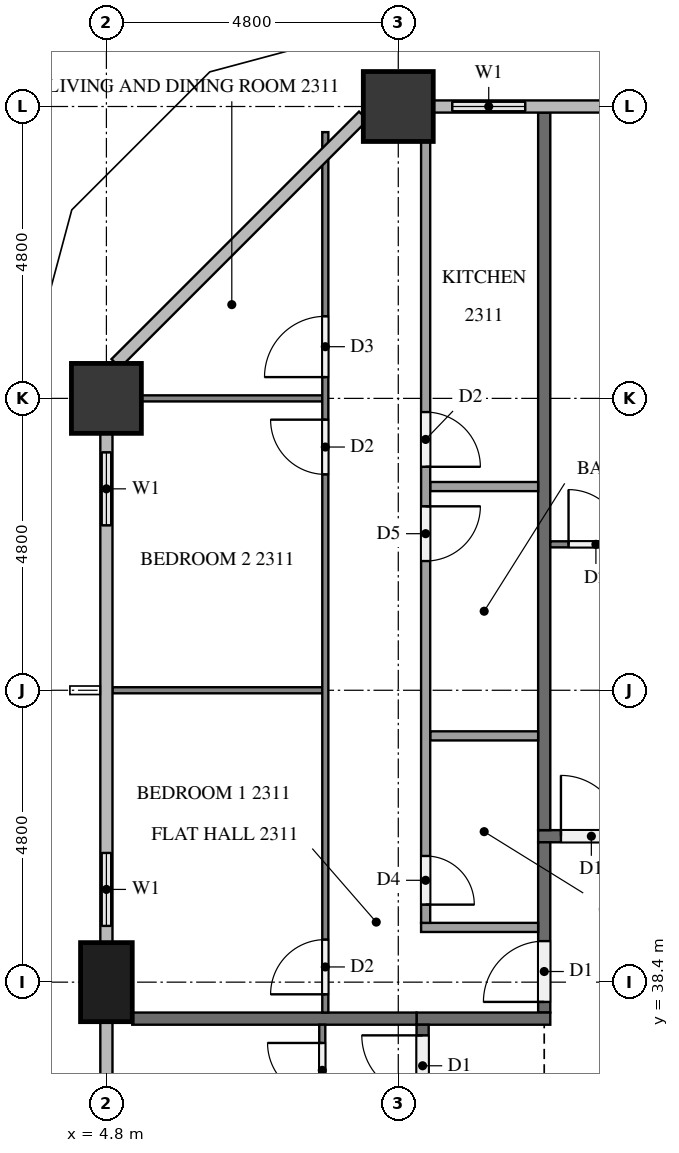
"""IFC4 building model, lengths in metres.
Left out: names, types, materials, properties, quantities, classifications, styles, units other than length and angle.
Written with IfcOpenShell. Run it as: python <this file> out.ifc"""

import sys

from ifc_helpers import new_model, si_unit, direction, frame, frame_2d, origin, origin_2d, place, context, subcontext, project, spatial, rectangle, extrude, element, fill, save


model = new_model("IFC4")
c1 = context("Model", 3, precision=1e-05, world=origin(), true_north=direction((0.0, 1.0)))
c2 = subcontext(c1, "Body", "Model", "MODEL_VIEW")
j1 = project(units=[si_unit("LENGTHUNIT", "METRE"), si_unit("PLANEANGLEUNIT", "RADIAN")], contexts=[c1])
p1 = place(None, origin())
s1 = spatial("IfcSite", under=j1, at=p1, CompositionType="ELEMENT")
p2 = place(p1, origin())
s2 = spatial("IfcBuilding", under=s1, at=p2, CompositionType="ELEMENT")
p3 = place(p2, frame((0.0, 0.0, 92.7)))
s3 = spatial("IfcBuildingStorey", under=s2, at=p3, CompositionType="ELEMENT", Elevation=92.7)
for number, where, z_axis, x_axis in (
    (1, (9.6, 52.8, 0.0), (0.0, 0.0, 1.0), (1.0, 0.0, 0.0)),
    (2, (4.8, 48.0, 0.0), (0.0, 0.0, 1.0), (1.0, 0.0, 0.0)),
):
    element("IfcColumn", number, at=place(p3, frame(where, z_axis=z_axis, x_axis=x_axis)), inside=s3, PredefinedType="COLUMN", context=c2, shape_type="SweptSolid", body=[
        extrude(rectangle(XDim=1.15, YDim=1.15, at=origin_2d()), origin(), (0.0, 0.0, 1.0), 3.2),
    ])
p4 = place(p3, frame((4.8, 38.4, 0.0), z_axis=(0.0, 0.0, 1.0), x_axis=(0.0, 1.0, 0.0)))
e3 = element("IfcColumn", 3, at=p4, inside=s3, PredefinedType="COLUMN", context=c2, shape_type="SweptSolid", body=[
    extrude(rectangle(XDim=1.3, YDim=0.85, at=origin_2d()), origin(), (0.0, 0.0, 1.0), 3.2),
])
p5 = place(p3, frame((12.0, 52.8, 0.0), z_axis=(0.0, 0.0, 1.0), x_axis=(-1.0, 0.0, 0.0)))
e4 = element("IfcWall", 4, at=p5, inside=s3, PredefinedType="SOLIDWALL", context=c2, shape_type="SweptSolid", body=[
    extrude(rectangle(XDim=1.825, YDim=0.15, at=frame_2d((0.913, 0.0))), origin(), (0.0, 0.0, 1.0), 3.2),
])
p6 = place(p5, frame((0.312, 0.0, 0.9)))
e5 = element("IfcOpeningElement", 5, at=p6, cuts=e4, PredefinedType="OPENING", context=c2, shape_type="SweptSolid", body=[
    extrude(rectangle(XDim=1.2, YDim=1.4, at=frame_2d((0.6, 0.7))), frame((0.0, 0.085, 0.0), z_axis=(0.0, -1.0, 0.0), x_axis=(1.0, 0.0, 0.0)), (0.0, 0.0, 1.0), 0.17),
])
p7 = place(p3, frame((4.8, 47.425, 0.0), z_axis=(0.0, 0.0, 1.0), x_axis=(0.0, -1.0, 0.0)))
e6 = element("IfcWall", 6, at=p7, inside=s3, PredefinedType="SOLIDWALL", context=c2, shape_type="SweptSolid", body=[
    extrude(rectangle(XDim=1.825, YDim=0.15, at=frame_2d((0.913, 0.0))), origin(), (0.0, 0.0, 1.0), 3.2),
])
p8 = place(p7, frame((0.312, 0.0, 0.9)))
e7 = element("IfcOpeningElement", 7, at=p8, cuts=e6, PredefinedType="OPENING", context=c2, shape_type="SweptSolid", body=[
    extrude(rectangle(XDim=1.2, YDim=1.4, at=frame_2d((0.6, 0.7))), frame((0.0, 0.085, 0.0), z_axis=(0.0, -1.0, 0.0), x_axis=(1.0, 0.0, 0.0)), (0.0, 0.0, 1.0), 0.17),
])
p9 = place(p3, frame((4.8, 40.8, 0.0), z_axis=(0.0, 0.0, 1.0), x_axis=(0.0, -1.0, 0.0)))
e8 = element("IfcWall", 8, at=p9, inside=s3, PredefinedType="SOLIDWALL", context=c2, shape_type="SweptSolid", body=[
    extrude(rectangle(XDim=1.75, YDim=0.15, at=frame_2d((0.875, 0.0))), origin(), (0.0, 0.0, 1.0), 3.2),
])
p10 = place(p9, frame((0.275, 0.0, 0.9)))
e9 = element("IfcOpeningElement", 9, at=p10, cuts=e8, PredefinedType="OPENING", context=c2, shape_type="SweptSolid", body=[
    extrude(rectangle(XDim=1.2, YDim=1.4, at=frame_2d((0.6, 0.7))), frame((0.0, 0.085, 0.0), z_axis=(0.0, -1.0, 0.0), x_axis=(1.0, 0.0, 0.0)), (0.0, 0.0, 1.0), 0.17),
])
p11 = place(p3, frame((11.9, 40.8, 0.0), z_axis=(0.0, 0.0, 1.0), x_axis=(1.0, 0.0, 0.0)))
e10 = element("IfcWall", 10, at=p11, inside=s3, PredefinedType="PARTITIONING", context=c2, shape_type="SweptSolid", body=[
    extrude(rectangle(XDim=38.6, YDim=0.2, at=frame_2d((19.3, 0.0))), origin(), (0.0, 0.0, 1.0), 3.2),
])
p12 = place(p11, frame((31.575, 0.0, 0.0)))
e11 = element("IfcOpeningElement", 11, at=p12, cuts=e10, PredefinedType="OPENING", context=c2, shape_type="SweptSolid", body=[
    extrude(rectangle(XDim=1.0, YDim=2.1, at=frame_2d((0.5, 1.05))), frame((0.0, 0.11, 0.0), z_axis=(0.0, -1.0, 0.0), x_axis=(1.0, 0.0, 0.0)), (0.0, 0.0, 1.0), 0.22),
])
p13 = place(p11, frame((14.775, 0.0, 0.0)))
e12 = element("IfcOpeningElement", 12, at=p13, cuts=e10, PredefinedType="OPENING", context=c2, shape_type="SweptSolid", body=[
    extrude(rectangle(XDim=1.0, YDim=2.1, at=frame_2d((0.5, 1.05))), frame((0.0, 0.11, 0.0), z_axis=(0.0, -1.0, 0.0), x_axis=(1.0, 0.0, 0.0)), (0.0, 0.0, 1.0), 0.22),
])
p14 = place(p11, frame((0.375, 0.0, 0.0)))
e13 = element("IfcOpeningElement", 13, at=p14, cuts=e10, PredefinedType="OPENING", context=c2, shape_type="SweptSolid", body=[
    extrude(rectangle(XDim=1.0, YDim=2.1, at=frame_2d((0.5, 1.05))), frame((0.0, 0.11, 0.0), z_axis=(0.0, -1.0, 0.0), x_axis=(1.0, 0.0, 0.0)), (0.0, 0.0, 1.0), 0.22),
])
p15 = place(p3, frame((12.0, 37.9, 0.0), z_axis=(0.0, 0.0, 1.0), x_axis=(0.0, 1.0, 0.0)))
e14 = element("IfcWall", 14, at=p15, inside=s3, PredefinedType="PARTITIONING", context=c2, shape_type="SweptSolid", body=[
    extrude(rectangle(XDim=2.8, YDim=0.2, at=frame_2d((1.4, 0.0))), origin(), (0.0, 0.0, 1.0), 3.2),
])
p16 = place(p15, frame((0.175, 0.0, 0.0)))
e15 = element("IfcOpeningElement", 15, at=p16, cuts=e14, PredefinedType="OPENING", context=c2, shape_type="SweptSolid", body=[
    extrude(rectangle(XDim=1.0, YDim=2.1, at=frame_2d((0.5, 1.05))), frame((0.0, 0.11, 0.0), z_axis=(0.0, -1.0, 0.0), x_axis=(1.0, 0.0, 0.0)), (0.0, 0.0, 1.0), 0.22),
])
p17 = place(p3, frame((12.1, 37.8, 0.0), z_axis=(0.0, 0.0, 1.0), x_axis=(-1.0, 0.0, 0.0)))
e16 = element("IfcWall", 16, at=p17, inside=s3, PredefinedType="PARTITIONING", context=c2, shape_type="SweptSolid", body=[
    extrude(rectangle(XDim=2.2, YDim=0.2, at=frame_2d((1.1, 0.0))), origin(), (0.0, 0.0, 1.0), 3.2),
])
p18 = place(p3, frame((10.0, 15.1, 0.0), z_axis=(0.0, 0.0, 1.0), x_axis=(0.0, 1.0, 0.0)))
e17 = element("IfcWall", 17, at=p18, inside=s3, PredefinedType="PARTITIONING", context=c2, shape_type="SweptSolid", body=[
    extrude(rectangle(XDim=22.6, YDim=0.2, at=frame_2d((11.3, 0.0))), origin(), (0.0, 0.0, 1.0), 3.2),
])
p19 = place(p18, frame((21.425, 0.0, 0.0)))
e18 = element("IfcOpeningElement", 18, at=p19, cuts=e17, PredefinedType="OPENING", context=c2, shape_type="SweptSolid", body=[
    extrude(rectangle(XDim=1.0, YDim=2.1, at=frame_2d((0.5, 1.05))), frame((0.0, 0.11, 0.0), z_axis=(0.0, -1.0, 0.0), x_axis=(1.0, 0.0, 0.0)), (0.0, 0.0, 1.0), 0.22),
])
p20 = place(p3, frame((12.0, 52.7, 0.0), z_axis=(0.0, 0.0, 1.0), x_axis=(0.0, -1.0, 0.0)))
e19 = element("IfcWall", 19, at=p20, inside=s3, PredefinedType="PARTITIONING", context=c2, shape_type="SweptSolid", body=[
    extrude(rectangle(XDim=11.8, YDim=0.2, at=frame_2d((5.9, 0.0))), origin(), (0.0, 0.0, 1.0), 3.2),
])
p21 = place(p3, frame((5.225, 37.8, 0.0), z_axis=(0.0, 0.0, 1.0), x_axis=(1.0, 0.0, 0.0)))
e20 = element("IfcWall", 20, at=p21, inside=s3, PredefinedType="PARTITIONING", context=c2, shape_type="SweptSolid", body=[
    extrude(rectangle(XDim=4.675, YDim=0.2, at=frame_2d((2.337, 0.0))), origin(), (0.0, 0.0, 1.0), 3.2),
])
p22 = place(p3, frame((12.1, 45.6, 0.0), z_axis=(0.0, 0.0, 1.0), x_axis=(1.0, 0.0, 0.0)))
e21 = element("IfcWall", 21, at=p22, inside=s3, PredefinedType="PARTITIONING", context=c2, shape_type="SweptSolid", body=[
    extrude(rectangle(XDim=14.2, YDim=0.1, at=frame_2d((7.1, 0.0))), origin(), (0.0, 0.0, 1.0), 3.2),
])
p23 = place(p22, frame((0.3, 0.0, 0.0)))
e22 = element("IfcOpeningElement", 22, at=p23, cuts=e21, PredefinedType="OPENING", context=c2, shape_type="SweptSolid", body=[
    extrude(rectangle(XDim=0.9, YDim=2.1, at=frame_2d((0.45, 1.05))), frame((0.0, 0.06, 0.0), z_axis=(0.0, -1.0, 0.0), x_axis=(1.0, 0.0, 0.0)), (0.0, 0.0, 1.0), 0.12),
])
p24 = place(p22, frame((8.15, 0.0, 0.0)))
e23 = element("IfcOpeningElement", 23, at=p24, cuts=e21, PredefinedType="OPENING", context=c2, shape_type="SweptSolid", body=[
    extrude(rectangle(XDim=1.0, YDim=2.1, at=frame_2d((0.5, 1.05))), frame((0.0, 0.06, 0.0), z_axis=(0.0, -1.0, 0.0), x_axis=(1.0, 0.0, 0.0)), (0.0, 0.0, 1.0), 0.12),
])
p25 = place(p22, frame((9.85, 0.0, 0.0)))
e24 = element("IfcOpeningElement", 24, at=p25, cuts=e21, PredefinedType="OPENING", context=c2, shape_type="SweptSolid", body=[
    extrude(rectangle(XDim=0.9, YDim=2.1, at=frame_2d((0.45, 1.05))), frame((0.0, 0.06, 0.0), z_axis=(0.0, -1.0, 0.0), x_axis=(1.0, 0.0, 0.0)), (0.0, 0.0, 1.0), 0.12),
])
p26 = place(p3, frame((8.35, 43.2, 0.0), z_axis=(0.0, 0.0, 1.0), x_axis=(-1.0, 0.0, 0.0)))
e25 = element("IfcWall", 25, at=p26, inside=s3, PredefinedType="PARTITIONING", context=c2, shape_type="SweptSolid", body=[
    extrude(rectangle(XDim=3.45, YDim=0.1, at=frame_2d((1.725, 0.0))), origin(), (0.0, 0.0, 1.0), 3.2),
])
p27 = place(p3, frame((8.35, 48.0, 0.0), z_axis=(0.0, 0.0, 1.0), x_axis=(-1.0, 0.0, 0.0)))
e26 = element("IfcWall", 26, at=p27, inside=s3, PredefinedType="PARTITIONING", context=c2, shape_type="SweptSolid", body=[
    extrude(rectangle(XDim=2.975, YDim=0.1, at=frame_2d((1.488, 0.0))), origin(), (0.0, 0.0, 1.0), 3.2),
])
p28 = place(p3, frame((8.4, 37.9, 0.0), z_axis=(0.0, 0.0, 1.0), x_axis=(0.0, 1.0, 0.0)))
e27 = element("IfcWall", 27, at=p28, inside=s3, PredefinedType="PARTITIONING", context=c2, shape_type="SweptSolid", body=[
    extrude(rectangle(XDim=14.479, YDim=0.1, at=frame_2d((7.239, 0.0))), origin(), (0.0, 0.0, 1.0), 3.2),
])
p29 = place(p28, frame((0.3, 0.0, 0.0)))
e28 = element("IfcOpeningElement", 28, at=p29, cuts=e27, PredefinedType="OPENING", context=c2, shape_type="SweptSolid", body=[
    extrude(rectangle(XDim=0.9, YDim=2.1, at=frame_2d((0.45, 1.05))), frame((0.0, 0.06, 0.0), z_axis=(0.0, -1.0, 0.0), x_axis=(1.0, 0.0, 0.0)), (0.0, 0.0, 1.0), 0.12),
])
p30 = place(p28, frame((8.85, 0.0, 0.0)))
e29 = element("IfcOpeningElement", 29, at=p30, cuts=e27, PredefinedType="OPENING", context=c2, shape_type="SweptSolid", body=[
    extrude(rectangle(XDim=0.9, YDim=2.1, at=frame_2d((0.45, 1.05))), frame((0.0, 0.06, 0.0), z_axis=(0.0, -1.0, 0.0), x_axis=(1.0, 0.0, 0.0)), (0.0, 0.0, 1.0), 0.12),
])
p31 = place(p28, frame((10.45, 0.0, 0.0)))
e30 = element("IfcOpeningElement", 30, at=p31, cuts=e27, PredefinedType="OPENING", context=c2, shape_type="SweptSolid", body=[
    extrude(rectangle(XDim=1.0, YDim=2.1, at=frame_2d((0.5, 1.05))), frame((0.0, 0.06, 0.0), z_axis=(0.0, -1.0, 0.0), x_axis=(1.0, 0.0, 0.0)), (0.0, 0.0, 1.0), 0.12),
])
for number, where, z_axis, x_axis in (
    (31, (11.9, 42.45, 0.0), (0.0, 0.0, 1.0), (-1.0, 0.0, 0.0)),
    (32, (11.9, 46.55, 0.0), (0.0, 0.0, 1.0), (-1.0, 0.0, 0.0)),
):
    element("IfcWall", number, at=place(p3, frame(where, z_axis=z_axis, x_axis=x_axis)), inside=s3, PredefinedType="PARTITIONING", context=c2, shape_type="SweptSolid", body=[
        extrude(rectangle(XDim=1.775, YDim=0.15, at=frame_2d((0.887, 0.0))), origin(), (0.0, 0.0, 1.0), 3.2),
    ])
p32 = place(p3, frame((11.9, 39.3, 0.0), z_axis=(0.0, 0.0, 1.0), x_axis=(-1.0, 0.0, 0.0)))
e33 = element("IfcWall", 33, at=p32, inside=s3, PredefinedType="PARTITIONING", context=c2, shape_type="SweptSolid", body=[
    extrude(rectangle(XDim=1.925, YDim=0.15, at=frame_2d((0.962, 0.0))), origin(), (0.0, 0.0, 1.0), 3.2),
])
p33 = place(p3, frame((10.05, 52.225, 0.0), z_axis=(0.0, 0.0, 1.0), x_axis=(0.0, -1.0, 0.0)))
e34 = element("IfcWall", 34, at=p33, inside=s3, PredefinedType="PARTITIONING", context=c2, shape_type="SweptSolid", body=[
    extrude(rectangle(XDim=12.85, YDim=0.15, at=frame_2d((6.425, 0.0))), origin(), (0.0, 0.0, 1.0), 3.2),
])
p34 = place(p33, frame((11.75, 0.0, 0.0)))
e35 = element("IfcOpeningElement", 35, at=p34, cuts=e34, PredefinedType="OPENING", context=c2, shape_type="SweptSolid", body=[
    extrude(rectangle(XDim=0.8, YDim=2.1, at=frame_2d((0.4, 1.05))), frame((0.0, 0.085, 0.0), z_axis=(0.0, -1.0, 0.0), x_axis=(1.0, 0.0, 0.0)), (0.0, 0.0, 1.0), 0.17),
])
p35 = place(p33, frame((6.0, 0.0, 0.0)))
e36 = element("IfcOpeningElement", 36, at=p35, cuts=e34, PredefinedType="OPENING", context=c2, shape_type="SweptSolid", body=[
    extrude(rectangle(XDim=0.9, YDim=2.1, at=frame_2d((0.45, 1.05))), frame((0.0, 0.085, 0.0), z_axis=(0.0, -1.0, 0.0), x_axis=(1.0, 0.0, 0.0)), (0.0, 0.0, 1.0), 0.17),
])
p36 = place(p33, frame((4.45, 0.0, 0.0)))
e37 = element("IfcOpeningElement", 37, at=p36, cuts=e34, PredefinedType="OPENING", context=c2, shape_type="SweptSolid", body=[
    extrude(rectangle(XDim=0.9, YDim=2.1, at=frame_2d((0.45, 1.05))), frame((0.0, 0.085, 0.0), z_axis=(0.0, -1.0, 0.0), x_axis=(1.0, 0.0, 0.0)), (0.0, 0.0, 1.0), 0.17),
])
p37 = place(p3, frame((8.35, 15.1, 0.0), z_axis=(0.0, 0.0, 1.0), x_axis=(0.0, 1.0, 0.0)))
e38 = element("IfcWall", 38, at=p37, inside=s3, PredefinedType="PARTITIONING", context=c2, shape_type="SweptSolid", body=[
    extrude(rectangle(XDim=22.6, YDim=0.1, at=frame_2d((11.3, 0.0))), origin(), (0.0, 0.0, 1.0), 3.2),
])
p38 = place(p37, frame((21.4, 0.0, 0.0)))
e39 = element("IfcOpeningElement", 39, at=p38, cuts=e38, PredefinedType="OPENING", context=c2, shape_type="SweptSolid", body=[
    extrude(rectangle(XDim=0.9, YDim=2.1, at=frame_2d((0.45, 1.05))), frame((0.0, 0.06, 0.0), z_axis=(0.0, -1.0, 0.0), x_axis=(1.0, 0.0, 0.0)), (0.0, 0.0, 1.0), 0.12),
])
p39 = place(p37, frame((11.65, 0.0, 0.0)))
e40 = element("IfcOpeningElement", 40, at=p39, cuts=e38, PredefinedType="OPENING", context=c2, shape_type="SweptSolid", body=[
    extrude(rectangle(XDim=1.0, YDim=2.1, at=frame_2d((0.5, 1.05))), frame((0.0, 0.06, 0.0), z_axis=(0.0, -1.0, 0.0), x_axis=(1.0, 0.0, 0.0)), (0.0, 0.0, 1.0), 0.12),
])
p40 = place(p37, frame((10.05, 0.0, 0.0)))
e41 = element("IfcOpeningElement", 41, at=p40, cuts=e38, PredefinedType="OPENING", context=c2, shape_type="SweptSolid", body=[
    extrude(rectangle(XDim=0.9, YDim=2.1, at=frame_2d((0.45, 1.05))), frame((0.0, 0.06, 0.0), z_axis=(0.0, -1.0, 0.0), x_axis=(1.0, 0.0, 0.0)), (0.0, 0.0, 1.0), 0.12),
])
p41 = place(p37, frame((4.45, 0.0, 0.0)))
e42 = element("IfcOpeningElement", 42, at=p41, cuts=e38, PredefinedType="OPENING", context=c2, shape_type="SweptSolid", body=[
    extrude(rectangle(XDim=0.9, YDim=2.1, at=frame_2d((0.45, 1.05))), frame((0.0, 0.06, 0.0), z_axis=(0.0, -1.0, 0.0), x_axis=(1.0, 0.0, 0.0)), (0.0, 0.0, 1.0), 0.12),
])
p42 = place(p37, frame((2.85, 0.0, 0.0)))
e43 = element("IfcOpeningElement", 43, at=p42, cuts=e38, PredefinedType="OPENING", context=c2, shape_type="SweptSolid", body=[
    extrude(rectangle(XDim=0.9, YDim=2.1, at=frame_2d((0.45, 1.05))), frame((0.0, 0.06, 0.0), z_axis=(0.0, -1.0, 0.0), x_axis=(1.0, 0.0, 0.0)), (0.0, 0.0, 1.0), 0.12),
])
p43 = place(p37, frame((0.3, 0.0, 0.0)))
e44 = element("IfcOpeningElement", 44, at=p43, cuts=e38, PredefinedType="OPENING", context=c2, shape_type="SweptSolid", body=[
    extrude(rectangle(XDim=0.8, YDim=2.1, at=frame_2d((0.4, 1.05))), frame((0.0, 0.06, 0.0), z_axis=(0.0, -1.0, 0.0), x_axis=(1.0, 0.0, 0.0)), (0.0, 0.0, 1.0), 0.12),
])
p44 = place(p6, origin())
e45 = element("IfcWindow", 45, at=p44, inside=s3, PartitioningType="SINGLE_PANEL", PredefinedType="WINDOW", context=c2, shape_type="SweptSolid", body=[
    extrude(rectangle(XDim=1.2, YDim=1.4, at=frame_2d((0.6, 0.7))), frame((0.0, 0.03, 0.0), z_axis=(0.0, -1.0, 0.0), x_axis=(1.0, 0.0, 0.0)), (0.0, 0.0, 1.0), 0.06),
])
fill(e5, e45)
p45 = place(p8, origin())
e46 = element("IfcWindow", 46, at=p45, inside=s3, PartitioningType="SINGLE_PANEL", PredefinedType="WINDOW", context=c2, shape_type="SweptSolid", body=[
    extrude(rectangle(XDim=1.2, YDim=1.4, at=frame_2d((0.6, 0.7))), frame((0.0, 0.03, 0.0), z_axis=(0.0, -1.0, 0.0), x_axis=(1.0, 0.0, 0.0)), (0.0, 0.0, 1.0), 0.06),
])
fill(e7, e46)
p46 = place(p10, origin())
e47 = element("IfcWindow", 47, at=p46, inside=s3, PartitioningType="SINGLE_PANEL", PredefinedType="WINDOW", context=c2, shape_type="SweptSolid", body=[
    extrude(rectangle(XDim=1.2, YDim=1.4, at=frame_2d((0.6, 0.7))), frame((0.0, 0.03, 0.0), z_axis=(0.0, -1.0, 0.0), x_axis=(1.0, 0.0, 0.0)), (0.0, 0.0, 1.0), 0.06),
])
fill(e9, e47)
p47 = place(p14, origin())
e48 = element("IfcDoor", 48, at=p47, inside=s3, OperationType="SINGLE_SWING_LEFT", PredefinedType="DOOR", context=c2, shape_type="SweptSolid", body=[
    extrude(rectangle(XDim=1.0, YDim=2.1, at=frame_2d((0.5, 1.05))), frame((0.0, 0.025, 0.0), z_axis=(0.0, -1.0, 0.0), x_axis=(1.0, 0.0, 0.0)), (0.0, 0.0, 1.0), 0.05),
])
fill(e13, e48)
p48 = place(p16, origin())
e49 = element("IfcDoor", 49, at=p48, inside=s3, OperationType="SINGLE_SWING_LEFT", PredefinedType="DOOR", context=c2, shape_type="SweptSolid", body=[
    extrude(rectangle(XDim=1.0, YDim=2.1, at=frame_2d((0.5, 1.05))), frame((0.0, 0.025, 0.0), z_axis=(0.0, -1.0, 0.0), x_axis=(1.0, 0.0, 0.0)), (0.0, 0.0, 1.0), 0.05),
])
fill(e15, e49)
p49 = place(p19, origin())
e50 = element("IfcDoor", 50, at=p49, inside=s3, OperationType="SINGLE_SWING_RIGHT", PredefinedType="DOOR", context=c2, shape_type="SweptSolid", body=[
    extrude(rectangle(XDim=1.0, YDim=2.1, at=frame_2d((0.5, 1.05))), frame((0.0, 0.025, 0.0), z_axis=(0.0, -1.0, 0.0), x_axis=(1.0, 0.0, 0.0)), (0.0, 0.0, 1.0), 0.05),
])
fill(e18, e50)
p50 = place(p23, origin())
e51 = element("IfcDoor", 51, at=p50, inside=s3, OperationType="SINGLE_SWING_LEFT", PredefinedType="DOOR", context=c2, shape_type="SweptSolid", body=[
    extrude(rectangle(XDim=0.9, YDim=2.1, at=frame_2d((0.45, 1.05))), frame((0.0, 0.025, 0.0), z_axis=(0.0, -1.0, 0.0), x_axis=(1.0, 0.0, 0.0)), (0.0, 0.0, 1.0), 0.05),
])
fill(e22, e51)
p51 = place(p29, origin())
e52 = element("IfcDoor", 52, at=p51, inside=s3, OperationType="SINGLE_SWING_LEFT", PredefinedType="DOOR", context=c2, shape_type="SweptSolid", body=[
    extrude(rectangle(XDim=0.9, YDim=2.1, at=frame_2d((0.45, 1.05))), frame((0.0, 0.025, 0.0), z_axis=(0.0, -1.0, 0.0), x_axis=(1.0, 0.0, 0.0)), (0.0, 0.0, 1.0), 0.05),
])
fill(e28, e52)
p52 = place(p30, origin())
e53 = element("IfcDoor", 53, at=p52, inside=s3, OperationType="SINGLE_SWING_RIGHT", PredefinedType="DOOR", context=c2, shape_type="SweptSolid", body=[
    extrude(rectangle(XDim=0.9, YDim=2.1, at=frame_2d((0.45, 1.05))), frame((0.0, 0.025, 0.0), z_axis=(0.0, -1.0, 0.0), x_axis=(1.0, 0.0, 0.0)), (0.0, 0.0, 1.0), 0.05),
])
fill(e29, e53)
p53 = place(p31, origin())
e54 = element("IfcDoor", 54, at=p53, inside=s3, OperationType="SINGLE_SWING_LEFT", PredefinedType="DOOR", context=c2, shape_type="SweptSolid", body=[
    extrude(rectangle(XDim=1.0, YDim=2.1, at=frame_2d((0.5, 1.05))), frame((0.0, 0.025, 0.0), z_axis=(0.0, -1.0, 0.0), x_axis=(1.0, 0.0, 0.0)), (0.0, 0.0, 1.0), 0.05),
])
fill(e30, e54)
p54 = place(p34, origin())
e55 = element("IfcDoor", 55, at=p54, inside=s3, OperationType="SINGLE_SWING_RIGHT", PredefinedType="DOOR", context=c2, shape_type="SweptSolid", body=[
    extrude(rectangle(XDim=0.8, YDim=2.1, at=frame_2d((0.4, 1.05))), frame((0.0, 0.025, 0.0), z_axis=(0.0, -1.0, 0.0), x_axis=(1.0, 0.0, 0.0)), (0.0, 0.0, 1.0), 0.05),
])
fill(e35, e55)
p55 = place(p35, origin())
e56 = element("IfcDoor", 56, at=p55, inside=s3, OperationType="SINGLE_SWING_LEFT", PredefinedType="DOOR", context=c2, shape_type="SweptSolid", body=[
    extrude(rectangle(XDim=0.9, YDim=2.1, at=frame_2d((0.45, 1.05))), frame((0.0, 0.025, 0.0), z_axis=(0.0, -1.0, 0.0), x_axis=(1.0, 0.0, 0.0)), (0.0, 0.0, 1.0), 0.05),
])
fill(e36, e56)
p56 = place(p36, origin())
e57 = element("IfcDoor", 57, at=p56, inside=s3, OperationType="SINGLE_SWING_RIGHT", PredefinedType="DOOR", context=c2, shape_type="SweptSolid", body=[
    extrude(rectangle(XDim=0.9, YDim=2.1, at=frame_2d((0.45, 1.05))), frame((0.0, 0.025, 0.0), z_axis=(0.0, -1.0, 0.0), x_axis=(1.0, 0.0, 0.0)), (0.0, 0.0, 1.0), 0.05),
])
fill(e37, e57)
p57 = place(p38, origin())
e58 = element("IfcDoor", 58, at=p57, inside=s3, OperationType="SINGLE_SWING_RIGHT", PredefinedType="DOOR", context=c2, shape_type="SweptSolid", body=[
    extrude(rectangle(XDim=0.9, YDim=2.1, at=frame_2d((0.45, 1.05))), frame((0.0, 0.025, 0.0), z_axis=(0.0, -1.0, 0.0), x_axis=(1.0, 0.0, 0.0)), (0.0, 0.0, 1.0), 0.05),
])
fill(e39, e58)
save(model, sys.argv[1])
